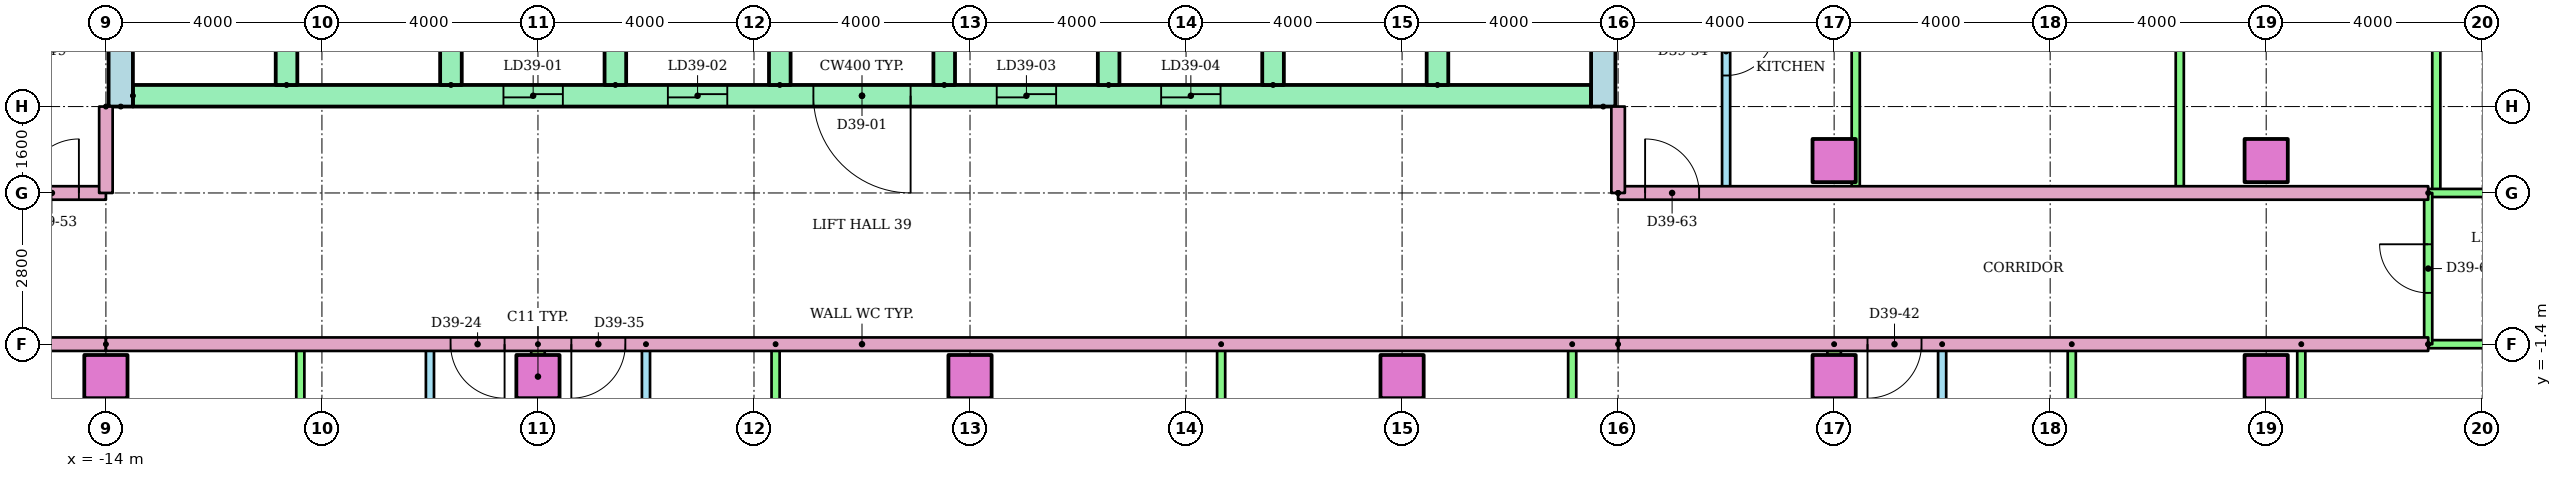
"""IFC4 building model, lengths in metres.
Left out: names, types, materials, properties, quantities, classifications, styles, units other than length and angle.
Written with IfcOpenShell. Run it as: python <this file> out.ifc"""

import sys

from ifc_helpers import new_model, si_unit, direction, frame, frame_2d, origin, origin_2d, place, context, subcontext, project, spatial, rectangle, extrude, element, fill, save


model = new_model("IFC4")
c1 = context("Model", 3, precision=1e-05, world=origin(), true_north=direction((0.0, 1.0)))
c2 = subcontext(c1, "Body", "Model", "MODEL_VIEW")
j1 = project(units=[si_unit("LENGTHUNIT", "METRE"), si_unit("PLANEANGLEUNIT", "RADIAN")], contexts=[c1])
p1 = place(None, origin())
s1 = spatial("IfcSite", under=j1, at=p1, CompositionType="ELEMENT")
p2 = place(p1, origin())
s2 = spatial("IfcBuilding", under=s1, at=p2, CompositionType="ELEMENT")
p3 = place(p2, frame((0.0, 0.0, 148.6)))
s3 = spatial("IfcBuildingStorey", under=s2, at=p3, CompositionType="ELEMENT", Elevation=148.6)
for number, where in (
    (1, (-14.0, -2.0, 0.0)),
    (2, (-6.0, -2.0, 0.0)),
    (3, (2.0, -2.0, 0.0)),
    (4, (10.0, -2.0, 0.0)),
    (5, (18.0, -2.0, 0.0)),
    (6, (26.0, -2.0, 0.0)),
    (7, (18.0, 2.0, 0.0)),
    (8, (26.0, 2.0, 0.0)),
):
    element("IfcColumn", number, at=place(p3, frame(where)), inside=s3, PredefinedType="COLUMN", context=c2, shape_type="SweptSolid", body=[
        extrude(rectangle(XDim=0.8, YDim=0.8, at=origin_2d()), origin(), (0.0, 0.0, 1.0), 3.2),
    ])
for number, where, z_axis, x_axis in (
    (9, (-13.725, 3.0, 0.0), (0.0, 0.0, 1.0), (0.0, 1.0, 0.0)),
    (10, (13.725, 3.0, 0.0), (0.0, 0.0, 1.0), (0.0, 1.0, 0.0)),
):
    element("IfcWall", number, at=place(p3, frame(where, z_axis=z_axis, x_axis=x_axis)), inside=s3, PredefinedType="SHEAR", context=c2, shape_type="SweptSolid", body=[
        extrude(rectangle(XDim=17.0, YDim=0.45, at=frame_2d((8.5, 0.0))), origin(), (0.0, 0.0, 1.0), 2.8),
    ])
p4 = place(p3, frame((-13.5, 3.2, 0.0)))
e11 = element("IfcWall", 11, at=p4, inside=s3, PredefinedType="SHEAR", context=c2, shape_type="SweptSolid", body=[
    extrude(rectangle(XDim=27.0, YDim=0.4, at=frame_2d((13.5, 0.0))), origin(), (0.0, 0.0, 1.0), 2.8),
])
p5 = place(p4, frame((6.861, 0.0, 0.0)))
e12 = element("IfcOpeningElement", 12, at=p5, cuts=e11, PredefinedType="OPENING", context=c2, shape_type="SweptSolid", body=[
    extrude(rectangle(XDim=1.1, YDim=2.1, at=frame_2d((0.55, 1.05))), frame((0.0, 0.21, 0.0), z_axis=(0.0, -1.0, 0.0), x_axis=(1.0, 0.0, 0.0)), (0.0, 0.0, 1.0), 0.42),
])
p6 = place(p4, frame((9.906, 0.0, 0.0)))
e13 = element("IfcOpeningElement", 13, at=p6, cuts=e11, PredefinedType="OPENING", context=c2, shape_type="SweptSolid", body=[
    extrude(rectangle(XDim=1.1, YDim=2.1, at=frame_2d((0.55, 1.05))), frame((0.0, 0.21, 0.0), z_axis=(0.0, -1.0, 0.0), x_axis=(1.0, 0.0, 0.0)), (0.0, 0.0, 1.0), 0.42),
])
p7 = place(p4, frame((15.994, 0.0, 0.0)))
e14 = element("IfcOpeningElement", 14, at=p7, cuts=e11, PredefinedType="OPENING", context=c2, shape_type="SweptSolid", body=[
    extrude(rectangle(XDim=1.1, YDim=2.1, at=frame_2d((0.55, 1.05))), frame((0.0, 0.21, 0.0), z_axis=(0.0, -1.0, 0.0), x_axis=(1.0, 0.0, 0.0)), (0.0, 0.0, 1.0), 0.42),
])
p8 = place(p4, frame((19.039, 0.0, 0.0)))
e15 = element("IfcOpeningElement", 15, at=p8, cuts=e11, PredefinedType="OPENING", context=c2, shape_type="SweptSolid", body=[
    extrude(rectangle(XDim=1.1, YDim=2.1, at=frame_2d((0.55, 1.05))), frame((0.0, 0.21, 0.0), z_axis=(0.0, -1.0, 0.0), x_axis=(1.0, 0.0, 0.0)), (0.0, 0.0, 1.0), 0.42),
])
p9 = place(p4, frame((12.6, 0.0, 0.0)))
e16 = element("IfcOpeningElement", 16, at=p9, cuts=e11, PredefinedType="OPENING", context=c2, shape_type="SweptSolid", body=[
    extrude(rectangle(XDim=1.8, YDim=2.1, at=frame_2d((0.9, 1.05))), frame((0.0, 0.21, 0.0), z_axis=(0.0, -1.0, 0.0), x_axis=(1.0, 0.0, 0.0)), (0.0, 0.0, 1.0), 0.42),
])
for number, where, z_axis, x_axis in (
    (17, (-10.656, 3.4, 0.0), (0.0, 0.0, 1.0), (0.0, 1.0, 0.0)),
    (18, (-7.611, 3.4, 0.0), (0.0, 0.0, 1.0), (0.0, 1.0, 0.0)),
    (19, (-4.567, 3.4, 0.0), (0.0, 0.0, 1.0), (0.0, 1.0, 0.0)),
    (20, (-1.522, 3.4, 0.0), (0.0, 0.0, 1.0), (0.0, 1.0, 0.0)),
    (21, (1.522, 3.4, 0.0), (0.0, 0.0, 1.0), (0.0, 1.0, 0.0)),
    (22, (4.567, 3.4, 0.0), (0.0, 0.0, 1.0), (0.0, 1.0, 0.0)),
    (23, (7.611, 3.4, 0.0), (0.0, 0.0, 1.0), (0.0, 1.0, 0.0)),
    (24, (10.656, 3.4, 0.0), (0.0, 0.0, 1.0), (0.0, 1.0, 0.0)),
):
    element("IfcWall", number, at=place(p3, frame(where, z_axis=z_axis, x_axis=x_axis)), inside=s3, PredefinedType="SHEAR", context=c2, shape_type="SweptSolid", body=[
        extrude(rectangle(XDim=3.0, YDim=0.4, at=frame_2d((1.5, 0.0))), origin(), (0.0, 0.0, 1.0), 2.8),
    ])
p10 = place(p3, frame((-8.0, -8.4, 0.0), z_axis=(0.0, 0.0, 1.0), x_axis=(0.0, 1.0, 0.0)))
e25 = element("IfcWall", 25, at=p10, inside=s3, PredefinedType="PARTITIONING", context=c2, shape_type="SweptSolid", body=[
    extrude(rectangle(XDim=7.0, YDim=0.15, at=frame_2d((3.5, 0.0))), origin(), (0.0, 0.0, 1.0), 2.4),
])
p11 = place(p10, frame((4.675, 0.0, 0.0)))
e26 = element("IfcOpeningElement", 26, at=p11, cuts=e25, PredefinedType="OPENING", context=c2, shape_type="SweptSolid", body=[
    extrude(rectangle(XDim=0.9, YDim=2.1, at=frame_2d((0.45, 1.05))), frame((0.0, 0.085, 0.0), z_axis=(0.0, -1.0, 0.0), x_axis=(1.0, 0.0, 0.0)), (0.0, 0.0, 1.0), 0.17),
])
p12 = place(p10, frame((1.225, 0.0, 0.0)))
e27 = element("IfcOpeningElement", 27, at=p12, cuts=e25, PredefinedType="OPENING", context=c2, shape_type="SweptSolid", body=[
    extrude(rectangle(XDim=0.8, YDim=2.1, at=frame_2d((0.4, 1.05))), frame((0.0, 0.085, 0.0), z_axis=(0.0, -1.0, 0.0), x_axis=(1.0, 0.0, 0.0)), (0.0, 0.0, 1.0), 0.17),
])
p13 = place(p3, frame((-10.4, -8.4, 0.0), z_axis=(0.0, 0.0, 1.0), x_axis=(0.0, 1.0, 0.0)))
e28 = element("IfcWall", 28, at=p13, inside=s3, PredefinedType="PARTITIONING", context=c2, shape_type="SweptSolid", body=[
    extrude(rectangle(XDim=7.0, YDim=0.15, at=frame_2d((3.5, 0.0))), origin(), (0.0, 0.0, 1.0), 2.4),
])
p14 = place(p3, frame((-4.0, -1.4, 0.0), z_axis=(0.0, 0.0, 1.0), x_axis=(0.0, -1.0, 0.0)))
e29 = element("IfcWall", 29, at=p14, inside=s3, PredefinedType="PARTITIONING", context=c2, shape_type="SweptSolid", body=[
    extrude(rectangle(XDim=7.0, YDim=0.15, at=frame_2d((3.5, 0.0))), origin(), (0.0, 0.0, 1.0), 2.4),
])
p15 = place(p14, frame((1.425, 0.0, 0.0)))
e30 = element("IfcOpeningElement", 30, at=p15, cuts=e29, PredefinedType="OPENING", context=c2, shape_type="SweptSolid", body=[
    extrude(rectangle(XDim=0.9, YDim=2.1, at=frame_2d((0.45, 1.05))), frame((0.0, 0.085, 0.0), z_axis=(0.0, -1.0, 0.0), x_axis=(1.0, 0.0, 0.0)), (0.0, 0.0, 1.0), 0.17),
])
p16 = place(p14, frame((4.975, 0.0, 0.0)))
e31 = element("IfcOpeningElement", 31, at=p16, cuts=e29, PredefinedType="OPENING", context=c2, shape_type="SweptSolid", body=[
    extrude(rectangle(XDim=0.8, YDim=2.1, at=frame_2d((0.4, 1.05))), frame((0.0, 0.085, 0.0), z_axis=(0.0, -1.0, 0.0), x_axis=(1.0, 0.0, 0.0)), (0.0, 0.0, 1.0), 0.17),
])
for number, where, z_axis, x_axis in (
    (32, (-1.6, -1.4, 0.0), (0.0, 0.0, 1.0), (0.0, -1.0, 0.0)),
    (33, (6.65, -1.4, 0.0), (0.0, 0.0, 1.0), (0.0, -1.0, 0.0)),
    (34, (13.15, -1.4, 0.0), (0.0, 0.0, 1.0), (0.0, -1.0, 0.0)),
):
    element("IfcWall", number, at=place(p3, frame(where, z_axis=z_axis, x_axis=x_axis)), inside=s3, PredefinedType="PARTITIONING", context=c2, shape_type="SweptSolid", body=[
        extrude(rectangle(XDim=7.0, YDim=0.15, at=frame_2d((3.5, 0.0))), origin(), (0.0, 0.0, 1.0), 2.4),
    ])
p17 = place(p3, frame((-6.0, -1.4, 0.0), z_axis=(0.0, 0.0, 1.0), x_axis=(0.0, -1.0, 0.0)))
e35 = element("IfcWall", 35, at=p17, inside=s3, PredefinedType="PARTITIONING", context=c2, shape_type="SweptSolid", body=[
    extrude(rectangle(XDim=14.91, YDim=0.25, at=frame_2d((7.455, 0.0))), origin(), (0.0, 0.0, 1.0), 2.4),
])
p18 = place(p3, frame((20.0, -1.4, 0.0), z_axis=(0.0, 0.0, 1.0), x_axis=(0.0, -1.0, 0.0)))
e36 = element("IfcWall", 36, at=p18, inside=s3, PredefinedType="PARTITIONING", context=c2, shape_type="SweptSolid", body=[
    extrude(rectangle(XDim=7.0, YDim=0.15, at=frame_2d((3.5, 0.0))), origin(), (0.0, 0.0, 1.0), 2.4),
])
p19 = place(p18, frame((1.425, 0.0, 0.0)))
e37 = element("IfcOpeningElement", 37, at=p19, cuts=e36, PredefinedType="OPENING", context=c2, shape_type="SweptSolid", body=[
    extrude(rectangle(XDim=0.9, YDim=2.1, at=frame_2d((0.45, 1.05))), frame((0.0, 0.085, 0.0), z_axis=(0.0, -1.0, 0.0), x_axis=(1.0, 0.0, 0.0)), (0.0, 0.0, 1.0), 0.17),
])
p20 = place(p18, frame((4.975, 0.0, 0.0)))
e38 = element("IfcOpeningElement", 38, at=p20, cuts=e36, PredefinedType="OPENING", context=c2, shape_type="SweptSolid", body=[
    extrude(rectangle(XDim=0.8, YDim=2.1, at=frame_2d((0.4, 1.05))), frame((0.0, 0.085, 0.0), z_axis=(0.0, -1.0, 0.0), x_axis=(1.0, 0.0, 0.0)), (0.0, 0.0, 1.0), 0.17),
])
for number, where, z_axis, x_axis in (
    (39, (22.4, -1.4, 0.0), (0.0, 0.0, 1.0), (0.0, -1.0, 0.0)),
    (40, (26.65, -1.4, 0.0), (0.0, 0.0, 1.0), (0.0, -1.0, 0.0)),
):
    element("IfcWall", number, at=place(p3, frame(where, z_axis=z_axis, x_axis=x_axis)), inside=s3, PredefinedType="PARTITIONING", context=c2, shape_type="SweptSolid", body=[
        extrude(rectangle(XDim=7.0, YDim=0.15, at=frame_2d((3.5, 0.0))), origin(), (0.0, 0.0, 1.0), 2.4),
    ])
p21 = place(p3, frame((18.0, -1.4, 0.0), z_axis=(0.0, 0.0, 1.0), x_axis=(0.0, -1.0, 0.0)))
e41 = element("IfcWall", 41, at=p21, inside=s3, PredefinedType="PARTITIONING", context=c2, shape_type="SweptSolid", body=[
    extrude(rectangle(XDim=14.91, YDim=0.25, at=frame_2d((7.455, 0.0))), origin(), (0.0, 0.0, 1.0), 2.4),
])
p22 = place(p3, frame((-14.0, -1.4, 0.0), z_axis=(0.0, 0.0, 1.0), x_axis=(-1.0, 0.0, 0.0)))
e42 = element("IfcWall", 42, at=p22, inside=s3, PredefinedType="PARTITIONING", context=c2, shape_type="SweptSolid", body=[
    extrude(rectangle(XDim=15.0, YDim=0.25, at=frame_2d((7.5, 0.0))), origin(), (0.0, 0.0, 1.0), 2.4),
])
p23 = place(p3, frame((29.0, -1.4, 0.0), z_axis=(0.0, 0.0, 1.0), x_axis=(-1.0, 0.0, 0.0)))
e43 = element("IfcWall", 43, at=p23, inside=s3, PredefinedType="PARTITIONING", context=c2, shape_type="SweptSolid", body=[
    extrude(rectangle(XDim=15.0, YDim=0.25, at=frame_2d((7.5, 0.0))), origin(), (0.0, 0.0, 1.0), 2.4),
])
p24 = place(p23, frame((9.382, 0.0, 0.0)))
e44 = element("IfcOpeningElement", 44, at=p24, cuts=e43, PredefinedType="OPENING", context=c2, shape_type="SweptSolid", body=[
    extrude(rectangle(XDim=1.0, YDim=2.1, at=frame_2d((0.5, 1.05))), frame((0.0, 0.135, 0.0), z_axis=(0.0, -1.0, 0.0), x_axis=(1.0, 0.0, 0.0)), (0.0, 0.0, 1.0), 0.27),
])
p25 = place(p3, frame((32.72, -1.4, 0.0), z_axis=(0.0, 0.0, 1.0), x_axis=(-1.0, 0.0, 0.0)))
e45 = element("IfcWall", 45, at=p25, inside=s3, PredefinedType="PARTITIONING", context=c2, shape_type="SweptSolid", body=[
    extrude(rectangle(XDim=3.72, YDim=0.15, at=frame_2d((1.86, 0.0))), origin(), (0.0, 0.0, 1.0), 2.4),
])
p26 = place(p3, frame((-29.0, 1.4, 0.0)))
e46 = element("IfcWall", 46, at=p26, inside=s3, PredefinedType="PARTITIONING", context=c2, shape_type="SweptSolid", body=[
    extrude(rectangle(XDim=15.0, YDim=0.25, at=frame_2d((7.5, 0.0))), origin(), (0.0, 0.0, 1.0), 2.4),
])
p27 = place(p26, frame((5.382, 0.0, 0.0)))
e47 = element("IfcOpeningElement", 47, at=p27, cuts=e46, PredefinedType="OPENING", context=c2, shape_type="SweptSolid", body=[
    extrude(rectangle(XDim=1.0, YDim=2.1, at=frame_2d((0.5, 1.05))), frame((0.0, 0.135, 0.0), z_axis=(0.0, -1.0, 0.0), x_axis=(1.0, 0.0, 0.0)), (0.0, 0.0, 1.0), 0.27),
])
p28 = place(p26, frame((13.5, 0.0, 0.0)))
e48 = element("IfcOpeningElement", 48, at=p28, cuts=e46, PredefinedType="OPENING", context=c2, shape_type="SweptSolid", body=[
    extrude(rectangle(XDim=1.0, YDim=2.1, at=frame_2d((0.5, 1.05))), frame((0.0, 0.135, 0.0), z_axis=(0.0, -1.0, 0.0), x_axis=(1.0, 0.0, 0.0)), (0.0, 0.0, 1.0), 0.27),
])
p29 = place(p3, frame((16.0, 10.8, 0.0), z_axis=(0.0, 0.0, 1.0), x_axis=(0.0, -1.0, 0.0)))
e49 = element("IfcWall", 49, at=p29, inside=s3, PredefinedType="PARTITIONING", context=c2, shape_type="SweptSolid", body=[
    extrude(rectangle(XDim=9.4, YDim=0.15, at=frame_2d((4.7, 0.0))), origin(), (0.0, 0.0, 1.0), 2.4),
])
p30 = place(p29, frame((6.325, 0.0, 0.0)))
e50 = element("IfcOpeningElement", 50, at=p30, cuts=e49, PredefinedType="OPENING", context=c2, shape_type="SweptSolid", body=[
    extrude(rectangle(XDim=0.9, YDim=2.1, at=frame_2d((0.45, 1.05))), frame((0.0, 0.085, 0.0), z_axis=(0.0, -1.0, 0.0), x_axis=(1.0, 0.0, 0.0)), (0.0, 0.0, 1.0), 0.17),
])
p31 = place(p29, frame((1.675, 0.0, 0.0)))
e51 = element("IfcOpeningElement", 51, at=p31, cuts=e49, PredefinedType="OPENING", context=c2, shape_type="SweptSolid", body=[
    extrude(rectangle(XDim=0.8, YDim=2.1, at=frame_2d((0.4, 1.05))), frame((0.0, 0.085, 0.0), z_axis=(0.0, -1.0, 0.0), x_axis=(1.0, 0.0, 0.0)), (0.0, 0.0, 1.0), 0.17),
])
for number, where, z_axis, x_axis in (
    (52, (18.4, 10.8, 0.0), (0.0, 0.0, 1.0), (0.0, -1.0, 0.0)),
    (53, (24.4, 10.8, 0.0), (0.0, 0.0, 1.0), (0.0, -1.0, 0.0)),
    (54, (29.15, 10.8, 0.0), (0.0, 0.0, 1.0), (0.0, -1.0, 0.0)),
):
    element("IfcWall", number, at=place(p3, frame(where, z_axis=z_axis, x_axis=x_axis)), inside=s3, PredefinedType="PARTITIONING", context=c2, shape_type="SweptSolid", body=[
        extrude(rectangle(XDim=9.4, YDim=0.15, at=frame_2d((4.7, 0.0))), origin(), (0.0, 0.0, 1.0), 2.4),
    ])
p32 = place(p3, frame((14.0, 1.4, 0.0)))
e55 = element("IfcWall", 55, at=p32, inside=s3, PredefinedType="PARTITIONING", context=c2, shape_type="SweptSolid", body=[
    extrude(rectangle(XDim=15.0, YDim=0.25, at=frame_2d((7.5, 0.0))), origin(), (0.0, 0.0, 1.0), 2.4),
])
p33 = place(p32, frame((0.5, 0.0, 0.0)))
e56 = element("IfcOpeningElement", 56, at=p33, cuts=e55, PredefinedType="OPENING", context=c2, shape_type="SweptSolid", body=[
    extrude(rectangle(XDim=1.0, YDim=2.1, at=frame_2d((0.5, 1.05))), frame((0.0, 0.135, 0.0), z_axis=(0.0, -1.0, 0.0), x_axis=(1.0, 0.0, 0.0)), (0.0, 0.0, 1.0), 0.27),
])
p34 = place(p3, frame((29.0, 1.4, 0.0)))
e57 = element("IfcWall", 57, at=p34, inside=s3, PredefinedType="PARTITIONING", context=c2, shape_type="SweptSolid", body=[
    extrude(rectangle(XDim=3.72, YDim=0.15, at=frame_2d((1.86, 0.0))), origin(), (0.0, 0.0, 1.0), 2.4),
])
p35 = place(p3, frame((29.0, -1.4, 0.0), z_axis=(0.0, 0.0, 1.0), x_axis=(0.0, 1.0, 0.0)))
e58 = element("IfcWall", 58, at=p35, inside=s3, PredefinedType="PARTITIONING", context=c2, shape_type="SweptSolid", body=[
    extrude(rectangle(XDim=2.8, YDim=0.15, at=frame_2d((1.4, 0.0))), origin(), (0.0, 0.0, 1.0), 2.4),
])
p36 = place(p35, frame((0.95, 0.0, 0.0)))
e59 = element("IfcOpeningElement", 59, at=p36, cuts=e58, PredefinedType="OPENING", context=c2, shape_type="SweptSolid", body=[
    extrude(rectangle(XDim=0.9, YDim=2.1, at=frame_2d((0.45, 1.05))), frame((0.0, 0.085, 0.0), z_axis=(0.0, -1.0, 0.0), x_axis=(1.0, 0.0, 0.0)), (0.0, 0.0, 1.0), 0.17),
])
p37 = place(p3, frame((14.0, -1.4, 0.0), z_axis=(0.0, 0.0, 1.0), x_axis=(-1.0, 0.0, 0.0)))
e60 = element("IfcWall", 60, at=p37, inside=s3, PredefinedType="PARTITIONING", context=c2, shape_type="SweptSolid", body=[
    extrude(rectangle(XDim=28.0, YDim=0.25, at=frame_2d((14.0, 0.0))), origin(), (0.0, 0.0, 1.0), 2.4),
])
p38 = place(p37, frame((20.618, 0.0, 0.0)))
e61 = element("IfcOpeningElement", 61, at=p38, cuts=e60, PredefinedType="OPENING", context=c2, shape_type="SweptSolid", body=[
    extrude(rectangle(XDim=1.0, YDim=2.1, at=frame_2d((0.5, 1.05))), frame((0.0, 0.135, 0.0), z_axis=(0.0, -1.0, 0.0), x_axis=(1.0, 0.0, 0.0)), (0.0, 0.0, 1.0), 0.27),
])
p39 = place(p37, frame((18.382, 0.0, 0.0)))
e62 = element("IfcOpeningElement", 62, at=p39, cuts=e60, PredefinedType="OPENING", context=c2, shape_type="SweptSolid", body=[
    extrude(rectangle(XDim=1.0, YDim=2.1, at=frame_2d((0.5, 1.05))), frame((0.0, 0.135, 0.0), z_axis=(0.0, -1.0, 0.0), x_axis=(1.0, 0.0, 0.0)), (0.0, 0.0, 1.0), 0.27),
])
for number, where, z_axis, x_axis in (
    (63, (-14.0, 3.0, 0.0), (0.0, 0.0, 1.0), (0.0, -1.0, 0.0)),
    (64, (14.0, 1.4, 0.0), (0.0, 0.0, 1.0), (0.0, 1.0, 0.0)),
):
    element("IfcWall", number, at=place(p3, frame(where, z_axis=z_axis, x_axis=x_axis)), inside=s3, PredefinedType="PARTITIONING", context=c2, shape_type="SweptSolid", body=[
        extrude(rectangle(XDim=1.6, YDim=0.25, at=frame_2d((0.8, 0.0))), origin(), (0.0, 0.0, 1.0), 2.4),
    ])
p40 = place(p5, origin())
e65 = element("IfcDoor", 65, at=p40, inside=s3, OperationType="SLIDING_TO_LEFT", PredefinedType="DOOR", context=c2, shape_type="SweptSolid", body=[
    extrude(rectangle(XDim=1.1, YDim=2.1, at=frame_2d((0.55, 1.05))), frame((0.0, 0.025, 0.0), z_axis=(0.0, -1.0, 0.0), x_axis=(1.0, 0.0, 0.0)), (0.0, 0.0, 1.0), 0.05),
])
fill(e12, e65)
p41 = place(p6, origin())
e66 = element("IfcDoor", 66, at=p41, inside=s3, OperationType="SLIDING_TO_LEFT", PredefinedType="DOOR", context=c2, shape_type="SweptSolid", body=[
    extrude(rectangle(XDim=1.1, YDim=2.1, at=frame_2d((0.55, 1.05))), frame((0.0, 0.025, 0.0), z_axis=(0.0, -1.0, 0.0), x_axis=(1.0, 0.0, 0.0)), (0.0, 0.0, 1.0), 0.05),
])
fill(e13, e66)
p42 = place(p7, origin())
e67 = element("IfcDoor", 67, at=p42, inside=s3, OperationType="SLIDING_TO_LEFT", PredefinedType="DOOR", context=c2, shape_type="SweptSolid", body=[
    extrude(rectangle(XDim=1.1, YDim=2.1, at=frame_2d((0.55, 1.05))), frame((0.0, 0.025, 0.0), z_axis=(0.0, -1.0, 0.0), x_axis=(1.0, 0.0, 0.0)), (0.0, 0.0, 1.0), 0.05),
])
fill(e14, e67)
p43 = place(p8, origin())
e68 = element("IfcDoor", 68, at=p43, inside=s3, OperationType="SLIDING_TO_LEFT", PredefinedType="DOOR", context=c2, shape_type="SweptSolid", body=[
    extrude(rectangle(XDim=1.1, YDim=2.1, at=frame_2d((0.55, 1.05))), frame((0.0, 0.025, 0.0), z_axis=(0.0, -1.0, 0.0), x_axis=(1.0, 0.0, 0.0)), (0.0, 0.0, 1.0), 0.05),
])
fill(e15, e68)
p44 = place(p9, frame((1.8, 0.0, 0.0), z_axis=(0.0, 0.0, 1.0), x_axis=(-1.0, 0.0, 0.0)))
e69 = element("IfcDoor", 69, at=p44, inside=s3, OperationType="DOUBLE_DOOR_SINGLE_SWING", PredefinedType="DOOR", context=c2, shape_type="SweptSolid", body=[
    extrude(rectangle(XDim=1.8, YDim=2.1, at=frame_2d((0.9, 1.05))), frame((0.0, 0.025, 0.0), z_axis=(0.0, -1.0, 0.0), x_axis=(1.0, 0.0, 0.0)), (0.0, 0.0, 1.0), 0.05),
])
fill(e16, e69)
p45 = place(p38, origin())
e70 = element("IfcDoor", 70, at=p45, inside=s3, OperationType="SINGLE_SWING_LEFT", PredefinedType="DOOR", context=c2, shape_type="SweptSolid", body=[
    extrude(rectangle(XDim=1.0, YDim=2.1, at=frame_2d((0.5, 1.05))), frame((0.0, 0.025, 0.0), z_axis=(0.0, -1.0, 0.0), x_axis=(1.0, 0.0, 0.0)), (0.0, 0.0, 1.0), 0.05),
])
fill(e61, e70)
p46 = place(p39, origin())
e71 = element("IfcDoor", 71, at=p46, inside=s3, OperationType="SINGLE_SWING_RIGHT", PredefinedType="DOOR", context=c2, shape_type="SweptSolid", body=[
    extrude(rectangle(XDim=1.0, YDim=2.1, at=frame_2d((0.5, 1.05))), frame((0.0, 0.025, 0.0), z_axis=(0.0, -1.0, 0.0), x_axis=(1.0, 0.0, 0.0)), (0.0, 0.0, 1.0), 0.05),
])
fill(e62, e71)
p47 = place(p24, origin())
e72 = element("IfcDoor", 72, at=p47, inside=s3, OperationType="SINGLE_SWING_RIGHT", PredefinedType="DOOR", context=c2, shape_type="SweptSolid", body=[
    extrude(rectangle(XDim=1.0, YDim=2.1, at=frame_2d((0.5, 1.05))), frame((0.0, 0.025, 0.0), z_axis=(0.0, -1.0, 0.0), x_axis=(1.0, 0.0, 0.0)), (0.0, 0.0, 1.0), 0.05),
])
fill(e44, e72)
p48 = place(p28, origin())
e73 = element("IfcDoor", 73, at=p48, inside=s3, OperationType="SINGLE_SWING_RIGHT", PredefinedType="DOOR", context=c2, shape_type="SweptSolid", body=[
    extrude(rectangle(XDim=1.0, YDim=2.1, at=frame_2d((0.5, 1.05))), frame((0.0, 0.025, 0.0), z_axis=(0.0, -1.0, 0.0), x_axis=(1.0, 0.0, 0.0)), (0.0, 0.0, 1.0), 0.05),
])
fill(e48, e73)
p49 = place(p30, origin())
e74 = element("IfcDoor", 74, at=p49, inside=s3, OperationType="SINGLE_SWING_LEFT", PredefinedType="DOOR", context=c2, shape_type="SweptSolid", body=[
    extrude(rectangle(XDim=0.9, YDim=2.1, at=frame_2d((0.45, 1.05))), frame((0.0, 0.025, 0.0), z_axis=(0.0, -1.0, 0.0), x_axis=(1.0, 0.0, 0.0)), (0.0, 0.0, 1.0), 0.05),
])
fill(e50, e74)
p50 = place(p33, origin())
e75 = element("IfcDoor", 75, at=p50, inside=s3, OperationType="SINGLE_SWING_LEFT", PredefinedType="DOOR", context=c2, shape_type="SweptSolid", body=[
    extrude(rectangle(XDim=1.0, YDim=2.1, at=frame_2d((0.5, 1.05))), frame((0.0, 0.025, 0.0), z_axis=(0.0, -1.0, 0.0), x_axis=(1.0, 0.0, 0.0)), (0.0, 0.0, 1.0), 0.05),
])
fill(e56, e75)
p51 = place(p36, origin())
e76 = element("IfcDoor", 76, at=p51, inside=s3, OperationType="SINGLE_SWING_RIGHT", PredefinedType="DOOR", context=c2, shape_type="SweptSolid", body=[
    extrude(rectangle(XDim=0.9, YDim=2.1, at=frame_2d((0.45, 1.05))), frame((0.0, 0.025, 0.0), z_axis=(0.0, -1.0, 0.0), x_axis=(1.0, 0.0, 0.0)), (0.0, 0.0, 1.0), 0.05),
])
fill(e59, e76)
save(model, sys.argv[1])
